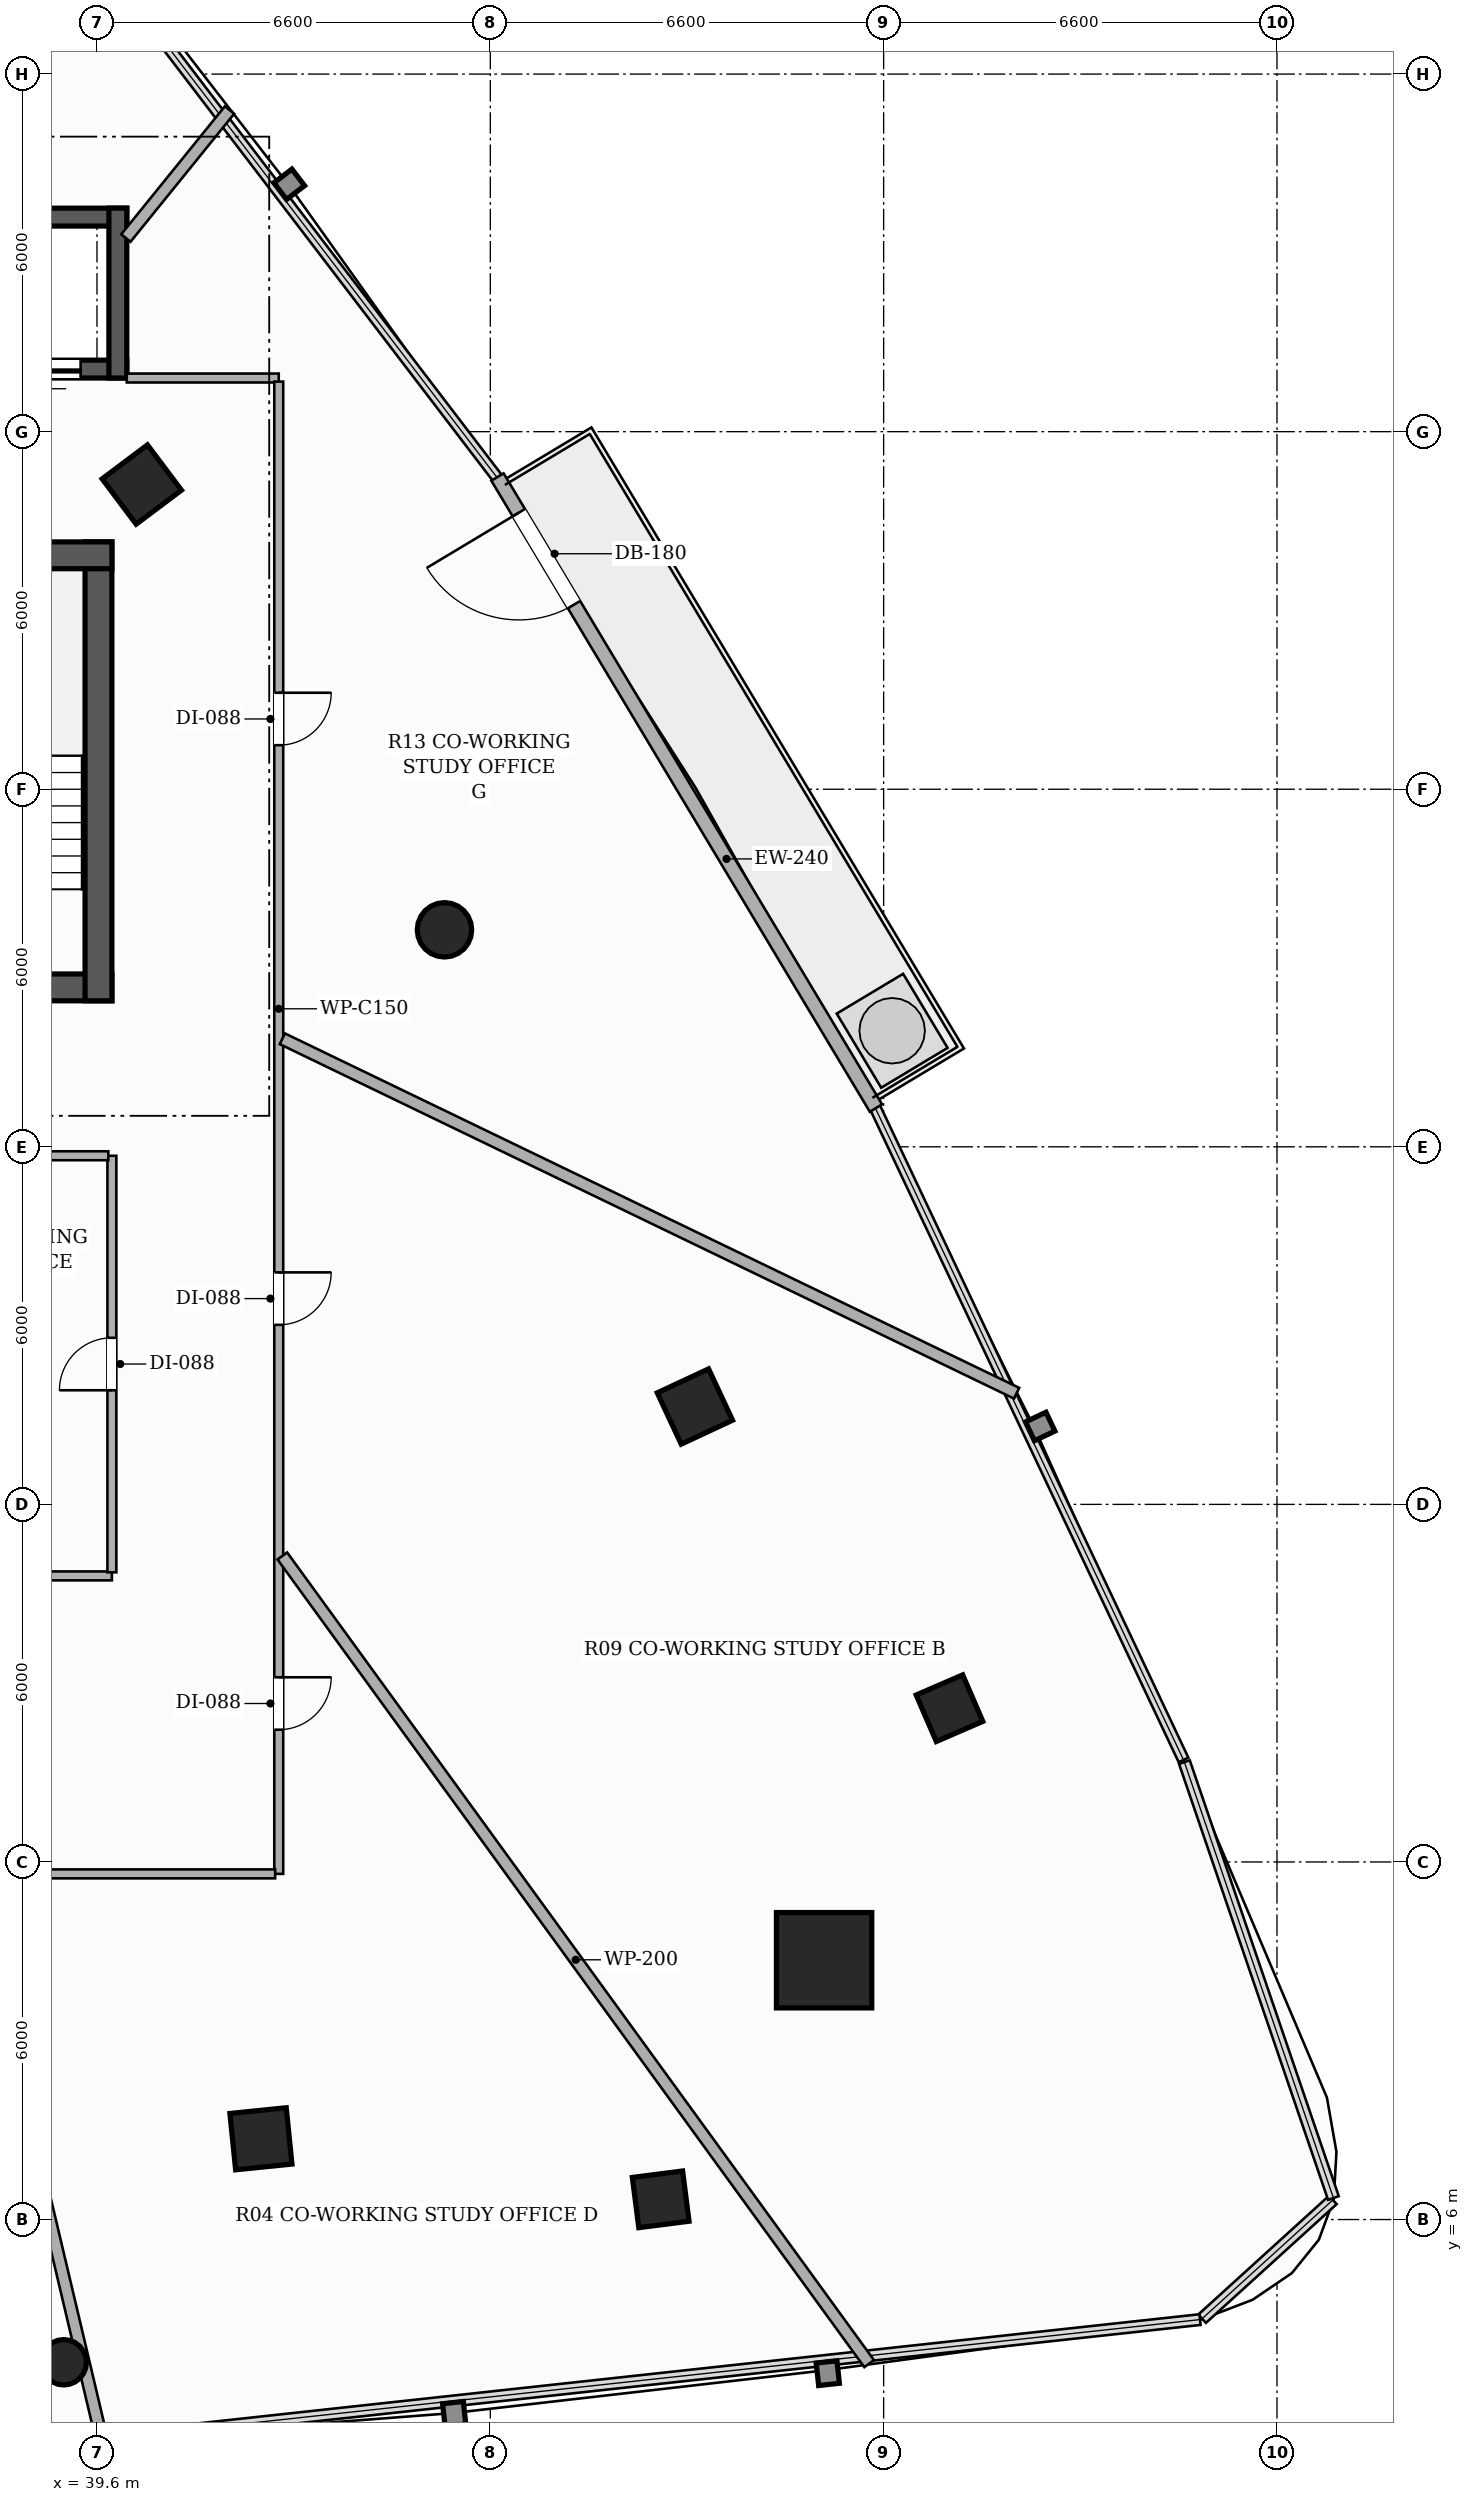
"""IFC4 building model, lengths in metres.
Left out: names, types, materials, properties, quantities, classifications, styles, units other than length and angle.
Written with IfcOpenShell. Run it as: python <this file> out.ifc"""

import sys

from ifc_helpers import new_model, si_unit, direction, frame, frame_2d, origin, origin_2d, place, context, subcontext, project, spatial, rectangle, hollow_rectangle, hollow_circle, extrude, element, fill, save


model = new_model("IFC4")
c1 = context("Model", 3, precision=1e-05, world=origin(), true_north=direction((0.0, 1.0)))
c2 = subcontext(c1, "Body", "Model", "MODEL_VIEW")
j1 = project(units=[si_unit("LENGTHUNIT", "METRE"), si_unit("PLANEANGLEUNIT", "RADIAN")], contexts=[c1])
p1 = place(None, origin())
s1 = spatial("IfcSite", under=j1, at=p1, CompositionType="ELEMENT")
p2 = place(p1, origin())
s2 = spatial("IfcBuilding", under=s1, at=p2, CompositionType="ELEMENT")
p3 = place(p2, frame((0.0, 0.0, 87.35)))
s3 = spatial("IfcBuildingStorey", under=s2, at=p3, CompositionType="ELEMENT", Elevation=87.35)
p4 = place(p3, frame((26.15, 26.675, 0.0), z_axis=(0.0, 0.0, 1.0), x_axis=(1.0, 0.0, 0.0)))
e1 = element("IfcWall", 1, at=p4, inside=s3, PredefinedType="SHEAR", context=c2, shape_type="SweptSolid", body=[
    extrude(rectangle(XDim=13.7, YDim=0.45, at=frame_2d((6.85, 0.0))), origin(), (0.0, 0.0, 1.0), 3.3),
])
p5 = place(p4, frame((4.35, 0.0, 0.0)))
e2 = element("IfcOpeningElement", 2, at=p5, cuts=e1, PredefinedType="OPENING", context=c2, shape_type="SweptSolid", body=[
    extrude(rectangle(XDim=1.05, YDim=2.15, at=frame_2d((0.525, 1.075))), frame((0.0, 0.235, 0.0), z_axis=(0.0, -1.0, 0.0), x_axis=(1.0, 0.0, 0.0)), (0.0, 0.0, 1.0), 0.47),
])
p6 = place(p4, frame((8.3, 0.0, 0.0)))
e3 = element("IfcOpeningElement", 3, at=p6, cuts=e1, PredefinedType="OPENING", context=c2, shape_type="SweptSolid", body=[
    extrude(rectangle(XDim=1.05, YDim=2.15, at=frame_2d((0.525, 1.075))), frame((0.0, 0.235, 0.0), z_axis=(0.0, -1.0, 0.0), x_axis=(1.0, 0.0, 0.0)), (0.0, 0.0, 1.0), 0.47),
])
p7 = place(p3, frame((39.625, 26.45, 0.0), z_axis=(0.0, 0.0, 1.0), x_axis=(0.0, 1.0, 0.0)))
e4 = element("IfcWall", 4, at=p7, inside=s3, PredefinedType="SHEAR", context=c2, shape_type="SweptSolid", body=[
    extrude(rectangle(XDim=7.7, YDim=0.45, at=frame_2d((3.85, 0.0))), origin(), (0.0, 0.0, 1.0), 3.3),
])
p8 = place(p3, frame((36.1, 33.925, 0.0), z_axis=(0.0, 0.0, 1.0), x_axis=(1.0, 0.0, 0.0)))
e5 = element("IfcWall", 5, at=p8, inside=s3, PredefinedType="SHEAR", context=c2, shape_type="SweptSolid", body=[
    extrude(rectangle(XDim=3.75, YDim=0.45, at=frame_2d((1.875, 0.0))), origin(), (0.0, 0.0, 1.0), 3.3),
])
p9 = place(p3, frame((40.1, 37.05, 0.0), z_axis=(0.0, 0.0, 1.0), x_axis=(-1.0, 0.0, 0.0)))
e6 = element("IfcWall", 6, at=p9, inside=s3, PredefinedType="SHEAR", context=c2, shape_type="SweptSolid", body=[
    extrude(rectangle(XDim=14.2, YDim=0.3, at=frame_2d((7.1, 0.0))), origin(), (0.0, 0.0, 1.0), 3.3),
])
p10 = place(p9, frame((12.325, 0.0, 0.0)))
e7 = element("IfcOpeningElement", 7, at=p10, cuts=e6, PredefinedType="OPENING", context=c2, shape_type="SweptSolid", body=[
    extrude(rectangle(XDim=1.1, YDim=2.2, at=frame_2d((0.55, 1.1))), frame((0.0, 0.16, 0.0), z_axis=(0.0, -1.0, 0.0), x_axis=(1.0, 0.0, 0.0)), (0.0, 0.0, 1.0), 0.32),
])
p11 = place(p9, frame((0.775, 0.0, 0.0)))
e8 = element("IfcOpeningElement", 8, at=p11, cuts=e6, PredefinedType="OPENING", context=c2, shape_type="SweptSolid", body=[
    extrude(rectangle(XDim=1.1, YDim=2.2, at=frame_2d((0.55, 1.1))), frame((0.0, 0.16, 0.0), z_axis=(0.0, -1.0, 0.0), x_axis=(1.0, 0.0, 0.0)), (0.0, 0.0, 1.0), 0.32),
])
p12 = place(p3, frame((25.9, 39.6, 0.0), z_axis=(0.0, 0.0, 1.0), x_axis=(1.0, 0.0, 0.0)))
e9 = element("IfcWall", 9, at=p12, inside=s3, PredefinedType="SHEAR", context=c2, shape_type="SweptSolid", body=[
    extrude(rectangle(XDim=14.2, YDim=0.3, at=frame_2d((7.1, 0.0))), origin(), (0.0, 0.0, 1.0), 3.3),
])
p13 = place(p3, frame((39.95, 36.9, 0.0), z_axis=(0.0, 0.0, 1.0), x_axis=(0.0, 1.0, 0.0)))
e10 = element("IfcWall", 10, at=p13, inside=s3, PredefinedType="SHEAR", context=c2, shape_type="SweptSolid", body=[
    extrude(rectangle(XDim=2.85, YDim=0.3, at=frame_2d((1.425, 0.0))), origin(), (0.0, 0.0, 1.0), 3.3),
])
p14 = place(p3, frame((51.801, 10.351, 0.0), z_axis=(0.0, 0.0, 1.0), x_axis=(1.0, 0.0, 0.0)))
e11 = element("IfcColumn", 11, at=p14, inside=s3, PredefinedType="COLUMN", context=c2, shape_type="SweptSolid", body=[
    extrude(hollow_rectangle(XDim=1.6, YDim=1.6, WallThickness=0.05, at=origin_2d()), origin(), (0.0, 0.0, 1.0), 3.3),
])
for number, where, z_axis, x_axis in (
    (12, (42.351, 7.355, 0.0), (0.0, 0.0, 1.0), (0.995, 0.101, 0.0)),
    (13, (49.633, 19.642, 0.0), (0.0, 0.0, 1.0), (-0.423, 0.906, 0.0)),
):
    element("IfcColumn", number, at=place(p3, frame(where, z_axis=z_axis, x_axis=x_axis)), inside=s3, PredefinedType="COLUMN", context=c2, shape_type="SweptSolid", body=[
        extrude(hollow_rectangle(XDim=0.95, YDim=0.95, WallThickness=0.032, at=origin_2d()), origin(), (0.0, 0.0, 1.0), 3.3),
    ])
p15 = place(p3, frame((45.431, 27.641, 0.0), z_axis=(0.0, 0.0, 1.0), x_axis=(1.0, 0.0, 0.0)))
e14 = element("IfcColumn", 14, at=p15, inside=s3, PredefinedType="COLUMN", context=c2, shape_type="SweptSolid", body=[
    extrude(hollow_circle(Radius=0.457, WallThickness=0.025, at=origin_2d()), origin(), (0.0, 0.0, 1.0), 3.3),
])
p16 = place(p3, frame((40.352, 35.113, 0.0), z_axis=(0.0, 0.0, 1.0), x_axis=(-0.600420225326, 0.799684658487, 0.0)))
e15 = element("IfcColumn", 15, at=p16, inside=s3, PredefinedType="COLUMN", context=c2, shape_type="SweptSolid", body=[
    extrude(hollow_rectangle(XDim=0.95, YDim=0.95, WallThickness=0.032, at=origin_2d()), origin(), (0.0, 0.0, 1.0), 3.3),
])
for number, where, z_axis, x_axis in (
    (16, (49.059, 6.339, 0.0), (0.0, 0.0, 1.0), (0.992, 0.127, 0.0)),
    (17, (53.905, 14.58, 0.0), (0.0, 0.0, 1.0), (-0.397, 0.918, 0.0)),
):
    element("IfcColumn", number, at=place(p3, frame(where, z_axis=z_axis, x_axis=x_axis)), inside=s3, PredefinedType="COLUMN", context=c2, shape_type="SweptSolid", body=[
        extrude(hollow_rectangle(XDim=0.85, YDim=0.85, WallThickness=0.028, at=origin_2d()), origin(), (0.0, 0.0, 1.0), 3.3),
    ])
p17 = place(p3, frame((39.042, 3.605, 0.0), z_axis=(0.0, 0.0, 1.0), x_axis=(1.0, 0.0, 0.0)))
e18 = element("IfcColumn", 18, at=p17, inside=s3, PredefinedType="COLUMN", context=c2, shape_type="SweptSolid", body=[
    extrude(hollow_circle(Radius=0.381, WallThickness=0.022, at=origin_2d()), origin(), (0.0, 0.0, 1.0), 3.3),
])
p18 = place(p3, frame((52.671, 24.65, 0.0), z_axis=(0.0, 0.0, 1.0), x_axis=(-0.514338730901, 0.857587120877, 0.0)))
e19 = element("IfcWall", 19, at=p18, inside=s3, PredefinedType="SOLIDWALL", context=c2, shape_type="SweptSolid", body=[
    extrude(rectangle(XDim=12.348, YDim=0.24, at=frame_2d((6.174, 0.0))), origin(), (0.0, 0.0, 1.0), 2.624),
])
p19 = place(p18, frame((9.85, 0.0, 0.0)))
e20 = element("IfcOpeningElement", 20, at=p19, cuts=e19, PredefinedType="OPENING", context=c2, shape_type="SweptSolid", body=[
    extrude(rectangle(XDim=1.8, YDim=2.2, at=frame_2d((0.9, 1.1))), frame((0.0, 0.13, 0.0), z_axis=(0.0, -1.0, 0.0), x_axis=(1.0, 0.0, 0.0)), (0.0, 0.0, 1.0), 0.26),
])
p20 = place(p3, frame((40.1, 36.9, 0.0), z_axis=(0.0, 0.0, 1.0), x_axis=(1.0, 0.0, 0.0)))
e21 = element("IfcWall", 21, at=p20, inside=s3, PredefinedType="PARTITIONING", context=c2, shape_type="SweptSolid", body=[
    extrude(rectangle(XDim=2.55, YDim=0.15, at=frame_2d((1.275, 0.0))), origin(), (0.0, 0.0, 1.0), 2.413),
])
p21 = place(p3, frame((42.65, 36.84, 0.0), z_axis=(0.0, 0.0, 1.0), x_axis=(0.0, -1.0, 0.0)))
e22 = element("IfcWall", 22, at=p21, inside=s3, PredefinedType="PARTITIONING", context=c2, shape_type="SweptSolid", body=[
    extrude(rectangle(XDim=25.04, YDim=0.15, at=frame_2d((12.52, 0.0))), origin(), (0.0, 0.0, 1.0), 2.413),
])
p22 = place(p21, frame((14.947, 0.0, 0.0)))
e23 = element("IfcOpeningElement", 23, at=p22, cuts=e22, PredefinedType="OPENING", context=c2, shape_type="SweptSolid", body=[
    extrude(rectangle(XDim=0.88, YDim=2.1, at=frame_2d((0.44, 1.05))), frame((0.0, 0.085, 0.0), z_axis=(0.0, -1.0, 0.0), x_axis=(1.0, 0.0, 0.0)), (0.0, 0.0, 1.0), 0.17),
])
p23 = place(p21, frame((21.741, 0.0, 0.0)))
e24 = element("IfcOpeningElement", 24, at=p23, cuts=e22, PredefinedType="OPENING", context=c2, shape_type="SweptSolid", body=[
    extrude(rectangle(XDim=0.88, YDim=2.1, at=frame_2d((0.44, 1.05))), frame((0.0, 0.085, 0.0), z_axis=(0.0, -1.0, 0.0), x_axis=(1.0, 0.0, 0.0)), (0.0, 0.0, 1.0), 0.17),
])
p24 = place(p21, frame((5.221, 0.0, 0.0)))
e25 = element("IfcOpeningElement", 25, at=p24, cuts=e22, PredefinedType="OPENING", context=c2, shape_type="SweptSolid", body=[
    extrude(rectangle(XDim=0.88, YDim=2.1, at=frame_2d((0.44, 1.05))), frame((0.0, 0.085, 0.0), z_axis=(0.0, -1.0, 0.0), x_axis=(1.0, 0.0, 0.0)), (0.0, 0.0, 1.0), 0.17),
])
p25 = place(p3, frame((42.59, 11.8, 0.0), z_axis=(0.0, 0.0, 1.0), x_axis=(-1.0, 0.0, 0.0)))
e26 = element("IfcWall", 26, at=p25, inside=s3, PredefinedType="PARTITIONING", context=c2, shape_type="SweptSolid", body=[
    extrude(rectangle(XDim=19.24, YDim=0.15, at=frame_2d((9.62, 0.0))), origin(), (0.0, 0.0, 1.0), 2.669),
])
p26 = place(p25, frame((9.245, 0.0, 0.0)))
e27 = element("IfcOpeningElement", 27, at=p26, cuts=e26, PredefinedType="OPENING", context=c2, shape_type="SweptSolid", body=[
    extrude(rectangle(XDim=0.92, YDim=2.15, at=frame_2d((0.46, 1.075))), frame((0.0, 0.085, 0.0), z_axis=(0.0, -1.0, 0.0), x_axis=(1.0, 0.0, 0.0)), (0.0, 0.0, 1.0), 0.17),
])
p27 = place(p3, frame((38.627, 16.8, 0.0), z_axis=(0.0, 0.0, 1.0), x_axis=(1.0, 0.0, 0.0)))
e28 = element("IfcWall", 28, at=p27, inside=s3, PredefinedType="PARTITIONING", context=c2, shape_type="SweptSolid", body=[
    extrude(rectangle(XDim=1.223, YDim=0.15, at=frame_2d((0.612, 0.0))), origin(), (0.0, 0.0, 1.0), 3.06),
])
p28 = place(p3, frame((39.85, 16.86, 0.0), z_axis=(0.0, 0.0, 1.0), x_axis=(0.0, 1.0, 0.0)))
e29 = element("IfcWall", 29, at=p28, inside=s3, PredefinedType="PARTITIONING", context=c2, shape_type="SweptSolid", body=[
    extrude(rectangle(XDim=6.99, YDim=0.15, at=frame_2d((3.495, 0.0))), origin(), (0.0, 0.0, 1.0), 2.669),
])
p29 = place(p28, frame((3.055, 0.0, 0.0)))
e30 = element("IfcOpeningElement", 30, at=p29, cuts=e29, PredefinedType="OPENING", context=c2, shape_type="SweptSolid", body=[
    extrude(rectangle(XDim=0.88, YDim=2.1, at=frame_2d((0.44, 1.05))), frame((0.0, 0.085, 0.0), z_axis=(0.0, -1.0, 0.0), x_axis=(1.0, 0.0, 0.0)), (0.0, 0.0, 1.0), 0.17),
])
p30 = place(p3, frame((39.79, 23.85, 0.0), z_axis=(0.0, 0.0, 1.0), x_axis=(-1.0, 0.0, 0.0)))
e31 = element("IfcWall", 31, at=p30, inside=s3, PredefinedType="PARTITIONING", context=c2, shape_type="SweptSolid", body=[
    extrude(rectangle(XDim=5.473, YDim=0.15, at=frame_2d((2.737, 0.0))), origin(), (0.0, 0.0, 1.0), 2.669),
])
p31 = place(p3, frame((41.824, 41.397, 0.0), z_axis=(0.0, 0.0, 1.0), x_axis=(-0.629241429285, -0.777209896792, 0.0)))
e32 = element("IfcWall", 32, at=p31, inside=s3, PredefinedType="PARTITIONING", context=c2, shape_type="SweptSolid", body=[
    extrude(rectangle(XDim=2.764, YDim=0.2, at=frame_2d((1.382, 0.0))), origin(), (0.0, 0.0, 1.0), 3.06),
])
p32 = place(p3, frame((52.557, 3.582, 0.0), z_axis=(0.0, 0.0, 1.0), x_axis=(-0.587789493476, 0.809013912958, 0.0)))
e33 = element("IfcWall", 33, at=p32, inside=s3, PredefinedType="PARTITIONING", context=c2, shape_type="SweptSolid", body=[
    extrude(rectangle(XDim=16.752, YDim=0.2, at=frame_2d((8.376, 0.0))), origin(), (0.0, 0.0, 1.0), 2.413),
])
p33 = place(p3, frame((42.71, 25.813, 0.0), z_axis=(0.0, 0.0, 1.0), x_axis=(0.900554286339, -0.434743576556, 0.0)))
e34 = element("IfcWall", 34, at=p33, inside=s3, PredefinedType="PARTITIONING", context=c2, shape_type="SweptSolid", body=[
    extrude(rectangle(XDim=13.682, YDim=0.2, at=frame_2d((6.841, 0.0))), origin(), (0.0, 0.0, 1.0), 2.413),
])
p34 = place(p3, frame((39.68, 2.316, 0.0), z_axis=(0.0, 0.0, 1.0), x_axis=(-0.230553694048, 0.973059604629, 0.0)))
e35 = element("IfcWall", 35, at=p34, inside=s3, PredefinedType="PARTITIONING", context=c2, shape_type="SweptSolid", body=[
    extrude(rectangle(XDim=9.685, YDim=0.2, at=frame_2d((4.843, 0.0))), origin(), (0.0, 0.0, 1.0), 2.413),
])
p35 = place(p19, origin())
e36 = element("IfcDoor", 36, at=p35, inside=s3, OperationType="SINGLE_SWING_RIGHT", PredefinedType="DOOR", context=c2, shape_type="SweptSolid", body=[
    extrude(rectangle(XDim=1.8, YDim=2.2, at=frame_2d((0.9, 1.1))), frame((0.0, 0.025, 0.0), z_axis=(0.0, -1.0, 0.0), x_axis=(1.0, 0.0, 0.0)), (0.0, 0.0, 1.0), 0.05),
])
fill(e20, e36)
p36 = place(p11, origin())
e37 = element("IfcDoor", 37, at=p36, inside=s3, OperationType="DOUBLE_DOOR_SLIDING", PredefinedType="DOOR", context=c2, shape_type="SweptSolid", body=[
    extrude(rectangle(XDim=1.1, YDim=2.2, at=frame_2d((0.55, 1.1))), frame((0.0, 0.025, 0.0), z_axis=(0.0, -1.0, 0.0), x_axis=(1.0, 0.0, 0.0)), (0.0, 0.0, 1.0), 0.05),
])
fill(e8, e37)
p37 = place(p22, origin())
e38 = element("IfcDoor", 38, at=p37, inside=s3, OperationType="SINGLE_SWING_LEFT", PredefinedType="DOOR", context=c2, shape_type="SweptSolid", body=[
    extrude(rectangle(XDim=0.88, YDim=2.1, at=frame_2d((0.44, 1.05))), frame((0.0, 0.025, 0.0), z_axis=(0.0, -1.0, 0.0), x_axis=(1.0, 0.0, 0.0)), (0.0, 0.0, 1.0), 0.05),
])
fill(e23, e38)
p38 = place(p23, origin())
e39 = element("IfcDoor", 39, at=p38, inside=s3, OperationType="SINGLE_SWING_LEFT", PredefinedType="DOOR", context=c2, shape_type="SweptSolid", body=[
    extrude(rectangle(XDim=0.88, YDim=2.1, at=frame_2d((0.44, 1.05))), frame((0.0, 0.025, 0.0), z_axis=(0.0, -1.0, 0.0), x_axis=(1.0, 0.0, 0.0)), (0.0, 0.0, 1.0), 0.05),
])
fill(e24, e39)
p39 = place(p24, origin())
e40 = element("IfcDoor", 40, at=p39, inside=s3, OperationType="SINGLE_SWING_LEFT", PredefinedType="DOOR", context=c2, shape_type="SweptSolid", body=[
    extrude(rectangle(XDim=0.88, YDim=2.1, at=frame_2d((0.44, 1.05))), frame((0.0, 0.025, 0.0), z_axis=(0.0, -1.0, 0.0), x_axis=(1.0, 0.0, 0.0)), (0.0, 0.0, 1.0), 0.05),
])
fill(e25, e40)
p40 = place(p29, origin())
e41 = element("IfcDoor", 41, at=p40, inside=s3, OperationType="SINGLE_SWING_LEFT", PredefinedType="DOOR", context=c2, shape_type="SweptSolid", body=[
    extrude(rectangle(XDim=0.88, YDim=2.1, at=frame_2d((0.44, 1.05))), frame((0.0, 0.025, 0.0), z_axis=(0.0, -1.0, 0.0), x_axis=(1.0, 0.0, 0.0)), (0.0, 0.0, 1.0), 0.05),
])
fill(e30, e41)
save(model, sys.argv[1])
